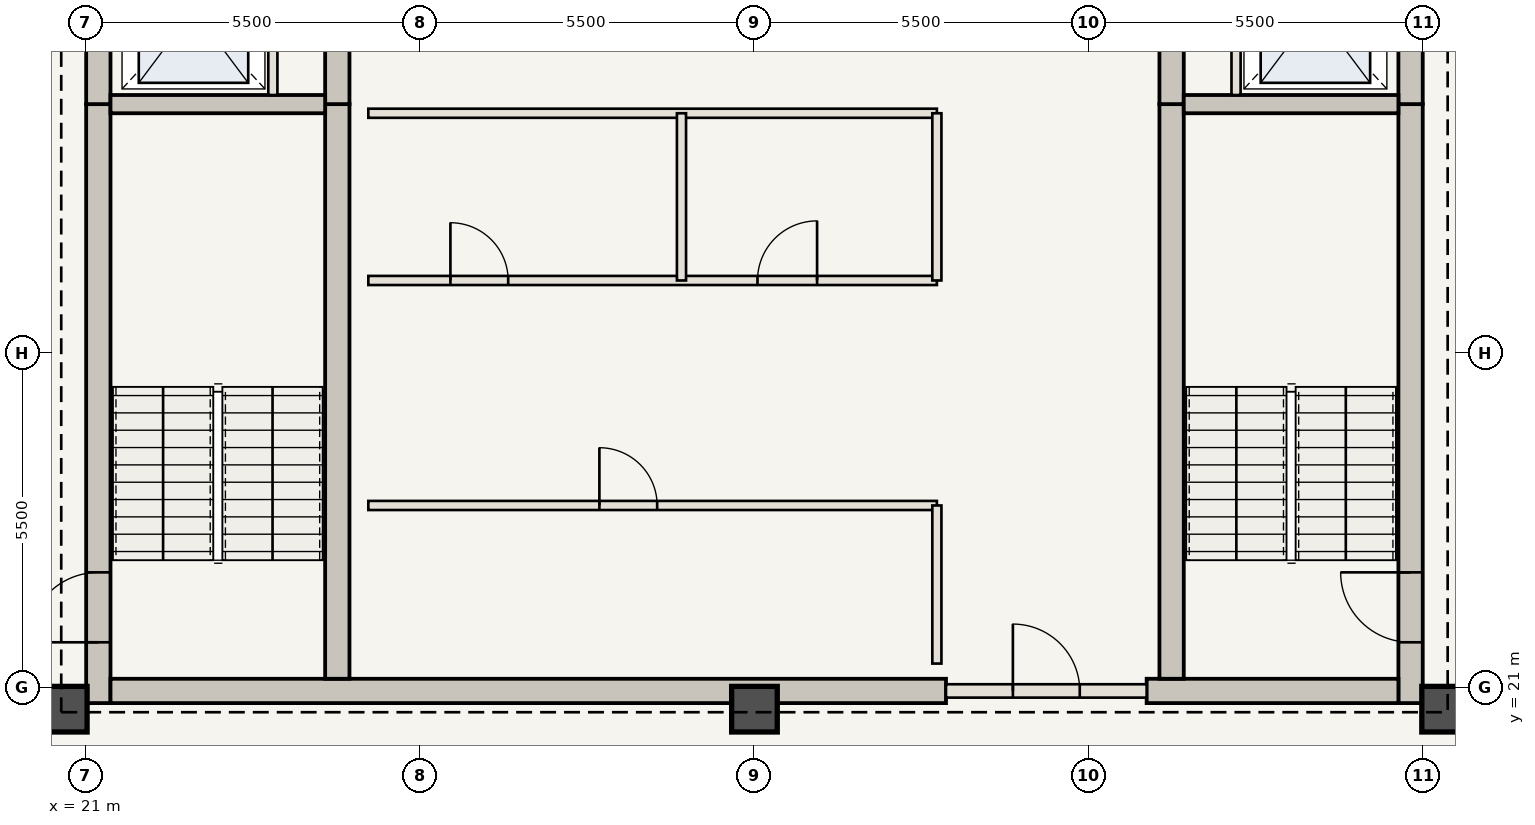
"""IFC4 building model, lengths in metres.
Left out: names, types, materials, properties, quantities, classifications, styles, units other than length and angle.
Written with IfcOpenShell. Run it as: python <this file> out.ifc"""

import sys

from ifc_helpers import new_model, si_unit, direction, frame, frame_2d, origin, origin_2d, place, context, subcontext, project, spatial, rectangle, extrude, element, fill, save


model = new_model("IFC4")
c1 = context("Model", 3, precision=1e-05, world=origin(), true_north=direction((0.0, 1.0)))
c2 = subcontext(c1, "Body", "Model", "MODEL_VIEW")
j1 = project(units=[si_unit("LENGTHUNIT", "METRE"), si_unit("PLANEANGLEUNIT", "RADIAN")], contexts=[c1])
p1 = place(None, origin())
s1 = spatial("IfcSite", under=j1, at=p1, CompositionType="ELEMENT")
p2 = place(p1, origin())
s2 = spatial("IfcBuilding", under=s1, at=p2, CompositionType="ELEMENT")
p3 = place(p2, frame((0.0, 0.0, 300.65)))
s3 = spatial("IfcBuildingStorey", under=s2, at=p3, CompositionType="ELEMENT", Elevation=300.65)
p4 = place(p3, frame((21.21, 20.75, 0.0), z_axis=(0.0, 0.0, 1.0), x_axis=(0.0, 1.0, 0.0)))
e1 = element("IfcWall", 1, at=p4, inside=s3, PredefinedType="SHEAR", context=c2, shape_type="SweptSolid", body=[
    extrude(rectangle(XDim=9.85, YDim=0.4, at=frame_2d((4.925, 0.0))), origin(), (0.0, 0.0, 1.0), 3.85),
])
p5 = place(p4, frame((1.0, 0.0, 0.0)))
e2 = element("IfcOpeningElement", 2, at=p5, cuts=e1, PredefinedType="OPENING", context=c2, shape_type="SweptSolid", body=[
    extrude(rectangle(XDim=1.15, YDim=2.15, at=frame_2d((0.575, 1.075))), frame((0.0, 0.21, 0.0), z_axis=(0.0, -1.0, 0.0), x_axis=(1.0, 0.0, 0.0)), (0.0, 0.0, 1.0), 0.42),
])
p6 = place(p3, frame((21.21, 30.6, 0.0), z_axis=(0.0, 0.0, 1.0), x_axis=(0.0, 1.0, 0.0)))
e3 = element("IfcWall", 3, at=p6, inside=s3, PredefinedType="SHEAR", context=c2, shape_type="SweptSolid", body=[
    extrude(rectangle(XDim=12.6, YDim=0.4, at=frame_2d((6.3, 0.0))), origin(), (0.0, 0.0, 1.0), 3.85),
])
p7 = place(p6, frame((4.2, 0.0, 0.0)))
e4 = element("IfcOpeningElement", 4, at=p7, cuts=e3, PredefinedType="OPENING", context=c2, shape_type="SweptSolid", body=[
    extrude(rectangle(XDim=1.1, YDim=2.15, at=frame_2d((0.55, 1.075))), frame((0.0, 0.21, 0.0), z_axis=(0.0, -1.0, 0.0), x_axis=(1.0, 0.0, 0.0)), (0.0, 0.0, 1.0), 0.42),
])
p8 = place(p6, frame((9.2, 0.0, 0.0)))
e5 = element("IfcOpeningElement", 5, at=p8, cuts=e3, PredefinedType="OPENING", context=c2, shape_type="SweptSolid", body=[
    extrude(rectangle(XDim=0.92, YDim=2.1, at=frame_2d((0.46, 1.05))), frame((0.0, 0.21, 0.0), z_axis=(0.0, -1.0, 0.0), x_axis=(1.0, 0.0, 0.0)), (0.0, 0.0, 1.0), 0.42),
])
p9 = place(p3, frame((42.79, 20.75, 0.0), z_axis=(0.0, 0.0, 1.0), x_axis=(0.0, 1.0, 0.0)))
e6 = element("IfcWall", 6, at=p9, inside=s3, PredefinedType="SHEAR", context=c2, shape_type="SweptSolid", body=[
    extrude(rectangle(XDim=9.85, YDim=0.4, at=frame_2d((4.925, 0.0))), origin(), (0.0, 0.0, 1.0), 3.85),
])
p10 = place(p9, frame((1.0, 0.0, 0.0)))
e7 = element("IfcOpeningElement", 7, at=p10, cuts=e6, PredefinedType="OPENING", context=c2, shape_type="SweptSolid", body=[
    extrude(rectangle(XDim=1.15, YDim=2.15, at=frame_2d((0.575, 1.075))), frame((0.0, 0.21, 0.0), z_axis=(0.0, -1.0, 0.0), x_axis=(1.0, 0.0, 0.0)), (0.0, 0.0, 1.0), 0.42),
])
p11 = place(p3, frame((42.79, 30.6, 0.0), z_axis=(0.0, 0.0, 1.0), x_axis=(0.0, 1.0, 0.0)))
e8 = element("IfcWall", 8, at=p11, inside=s3, PredefinedType="SHEAR", context=c2, shape_type="SweptSolid", body=[
    extrude(rectangle(XDim=12.6, YDim=0.4, at=frame_2d((6.3, 0.0))), origin(), (0.0, 0.0, 1.0), 3.85),
])
p12 = place(p11, frame((4.2, 0.0, 0.0)))
e9 = element("IfcOpeningElement", 9, at=p12, cuts=e8, PredefinedType="OPENING", context=c2, shape_type="SweptSolid", body=[
    extrude(rectangle(XDim=1.1, YDim=2.15, at=frame_2d((0.55, 1.075))), frame((0.0, 0.21, 0.0), z_axis=(0.0, -1.0, 0.0), x_axis=(1.0, 0.0, 0.0)), (0.0, 0.0, 1.0), 0.42),
])
p13 = place(p11, frame((8.05, 0.0, 0.0)))
e10 = element("IfcOpeningElement", 10, at=p13, cuts=e8, PredefinedType="OPENING", context=c2, shape_type="SweptSolid", body=[
    extrude(rectangle(XDim=0.88, YDim=2.1, at=frame_2d((0.44, 1.05))), frame((0.0, 0.21, 0.0), z_axis=(0.0, -1.0, 0.0), x_axis=(1.0, 0.0, 0.0)), (0.0, 0.0, 1.0), 0.42),
])
p14 = place(p11, frame((9.45, 0.0, 0.0)))
e11 = element("IfcOpeningElement", 11, at=p14, cuts=e8, PredefinedType="OPENING", context=c2, shape_type="SweptSolid", body=[
    extrude(rectangle(XDim=0.88, YDim=2.1, at=frame_2d((0.44, 1.05))), frame((0.0, 0.21, 0.0), z_axis=(0.0, -1.0, 0.0), x_axis=(1.0, 0.0, 0.0)), (0.0, 0.0, 1.0), 0.42),
])
p15 = place(p11, frame((10.85, 0.0, 0.0)))
e12 = element("IfcOpeningElement", 12, at=p15, cuts=e8, PredefinedType="OPENING", context=c2, shape_type="SweptSolid", body=[
    extrude(rectangle(XDim=0.88, YDim=2.1, at=frame_2d((0.44, 1.05))), frame((0.0, 0.21, 0.0), z_axis=(0.0, -1.0, 0.0), x_axis=(1.0, 0.0, 0.0)), (0.0, 0.0, 1.0), 0.42),
])
p16 = place(p3, frame((21.41, 20.95, 0.0), z_axis=(0.0, 0.0, 1.0), x_axis=(1.0, 0.0, 0.0)))
e13 = element("IfcWall", 13, at=p16, inside=s3, PredefinedType="SHEAR", context=c2, shape_type="SweptSolid", body=[
    extrude(rectangle(XDim=13.74, YDim=0.4, at=frame_2d((6.87, 0.0))), origin(), (0.0, 0.0, 1.0), 3.85),
])
p17 = place(p3, frame((38.45, 20.95, 0.0), z_axis=(0.0, 0.0, 1.0), x_axis=(1.0, 0.0, 0.0)))
e14 = element("IfcWall", 14, at=p17, inside=s3, PredefinedType="SHEAR", context=c2, shape_type="SweptSolid", body=[
    extrude(rectangle(XDim=4.14, YDim=0.4, at=frame_2d((2.07, 0.0))), origin(), (0.0, 0.0, 1.0), 3.85),
])
p18 = place(p3, frame((25.14, 21.15, 0.0), z_axis=(0.0, 0.0, 1.0), x_axis=(0.0, 1.0, 0.0)))
e15 = element("IfcWall", 15, at=p18, inside=s3, PredefinedType="SHEAR", context=c2, shape_type="SweptSolid", body=[
    extrude(rectangle(XDim=9.45, YDim=0.4, at=frame_2d((4.725, 0.0))), origin(), (0.0, 0.0, 1.0), 3.85),
])
p19 = place(p3, frame((25.14, 30.6, 0.0), z_axis=(0.0, 0.0, 1.0), x_axis=(0.0, 1.0, 0.0)))
e16 = element("IfcWall", 16, at=p19, inside=s3, PredefinedType="SHEAR", context=c2, shape_type="SweptSolid", body=[
    extrude(rectangle(XDim=12.2, YDim=0.4, at=frame_2d((6.1, 0.0))), origin(), (0.0, 0.0, 1.0), 3.85),
])
p20 = place(p19, frame((6.25, 0.0, 0.0)))
e17 = element("IfcOpeningElement", 17, at=p20, cuts=e16, PredefinedType="OPENING", context=c2, shape_type="SweptSolid", body=[
    extrude(rectangle(XDim=1.1, YDim=2.15, at=frame_2d((0.55, 1.075))), frame((0.0, 0.21, 0.0), z_axis=(0.0, -1.0, 0.0), x_axis=(1.0, 0.0, 0.0)), (0.0, 0.0, 1.0), 0.42),
])
p21 = place(p3, frame((38.86, 21.15, 0.0), z_axis=(0.0, 0.0, 1.0), x_axis=(0.0, 1.0, 0.0)))
e18 = element("IfcWall", 18, at=p21, inside=s3, PredefinedType="SHEAR", context=c2, shape_type="SweptSolid", body=[
    extrude(rectangle(XDim=9.45, YDim=0.4, at=frame_2d((4.725, 0.0))), origin(), (0.0, 0.0, 1.0), 3.85),
])
p22 = place(p3, frame((38.86, 30.6, 0.0), z_axis=(0.0, 0.0, 1.0), x_axis=(0.0, 1.0, 0.0)))
e19 = element("IfcWall", 19, at=p22, inside=s3, PredefinedType="SHEAR", context=c2, shape_type="SweptSolid", body=[
    extrude(rectangle(XDim=12.2, YDim=0.4, at=frame_2d((6.1, 0.0))), origin(), (0.0, 0.0, 1.0), 3.85),
])
for number, where, z_axis, x_axis in (
    (20, (20.65, 20.65, 0.0), (0.0, 0.0, 1.0), (1.0, 0.0, 0.0)),
    (21, (32.0, 20.65, 0.0), (0.0, 0.0, 1.0), (1.0, 0.0, 0.0)),
    (22, (43.35, 20.65, 0.0), (0.0, 0.0, 1.0), (1.0, 0.0, 0.0)),
):
    element("IfcColumn", number, at=place(p3, frame(where, z_axis=z_axis, x_axis=x_axis)), inside=s3, PredefinedType="COLUMN", context=c2, shape_type="SweptSolid", body=[
        extrude(rectangle(XDim=0.75, YDim=0.75, at=origin_2d()), origin(), (0.0, 0.0, 1.0), 3.85),
    ])
for number, where, z_axis, x_axis in (
    (23, (21.41, 30.6, 0.0), (0.0, 0.0, 1.0), (1.0, 0.0, 0.0)),
    (24, (39.06, 30.6, 0.0), (0.0, 0.0, 1.0), (1.0, 0.0, 0.0)),
):
    element("IfcWall", number, at=place(p3, frame(where, z_axis=z_axis, x_axis=x_axis)), inside=s3, PredefinedType="SHEAR", context=c2, shape_type="SweptSolid", body=[
        extrude(rectangle(XDim=3.53, YDim=0.3, at=frame_2d((1.765, 0.0))), origin(), (0.0, 0.0, 1.0), 3.685),
    ])
for number, where, z_axis, x_axis in (
    (25, (24.08, 30.75, 0.0), (0.0, 0.0, 1.0), (0.0, 1.0, 0.0)),
    (26, (39.92, 30.75, 0.0), (0.0, 0.0, 1.0), (0.0, 1.0, 0.0)),
):
    element("IfcWall", number, at=place(p3, frame(where, z_axis=z_axis, x_axis=x_axis)), inside=s3, PredefinedType="STANDARD", context=c2, shape_type="SweptSolid", body=[
        extrude(rectangle(XDim=2.65, YDim=0.15, at=frame_2d((1.325, 0.0))), origin(), (0.0, 0.0, 1.0), 3.685),
    ])
p23 = place(p3, frame((35.15, 20.95, 0.0), z_axis=(0.0, 0.0, 1.0), x_axis=(1.0, 0.0, 0.0)))
e27 = element("IfcWall", 27, at=p23, inside=s3, PredefinedType="STANDARD", context=c2, shape_type="SweptSolid", body=[
    extrude(rectangle(XDim=3.3, YDim=0.22, at=frame_2d((1.65, 0.0))), origin(), (0.0, 0.0, 1.0), 3.685),
])
p24 = place(p23, frame((1.1, 0.0, 0.0)))
e28 = element("IfcOpeningElement", 28, at=p24, cuts=e27, PredefinedType="OPENING", context=c2, shape_type="SweptSolid", body=[
    extrude(rectangle(XDim=1.1, YDim=2.15, at=frame_2d((0.55, 1.075))), frame((0.0, 0.12, 0.0), z_axis=(0.0, -1.0, 0.0), x_axis=(1.0, 0.0, 0.0)), (0.0, 0.0, 1.0), 0.24),
])
p25 = place(p3, frame((25.65, 24.0, 0.0), z_axis=(0.0, 0.0, 1.0), x_axis=(1.0, 0.0, 0.0)))
e29 = element("IfcWall", 29, at=p25, inside=s3, PredefinedType="STANDARD", context=c2, shape_type="SweptSolid", body=[
    extrude(rectangle(XDim=9.35, YDim=0.15, at=frame_2d((4.675, 0.0))), origin(), (0.0, 0.0, 1.0), 3.685),
])
p26 = place(p25, frame((3.8, 0.0, 0.0)))
e30 = element("IfcOpeningElement", 30, at=p26, cuts=e29, PredefinedType="OPENING", context=c2, shape_type="SweptSolid", body=[
    extrude(rectangle(XDim=0.95, YDim=2.15, at=frame_2d((0.475, 1.075))), frame((0.0, 0.085, 0.0), z_axis=(0.0, -1.0, 0.0), x_axis=(1.0, 0.0, 0.0)), (0.0, 0.0, 1.0), 0.17),
])
p27 = place(p3, frame((35.0, 21.4, 0.0), z_axis=(0.0, 0.0, 1.0), x_axis=(0.0, 1.0, 0.0)))
e31 = element("IfcWall", 31, at=p27, inside=s3, PredefinedType="STANDARD", context=c2, shape_type="SweptSolid", body=[
    extrude(rectangle(XDim=2.6, YDim=0.15, at=frame_2d((1.3, 0.0))), origin(), (0.0, 0.0, 1.0), 3.685),
])
p28 = place(p3, frame((25.65, 27.7, 0.0), z_axis=(0.0, 0.0, 1.0), x_axis=(1.0, 0.0, 0.0)))
e32 = element("IfcWall", 32, at=p28, inside=s3, PredefinedType="STANDARD", context=c2, shape_type="SweptSolid", body=[
    extrude(rectangle(XDim=9.35, YDim=0.15, at=frame_2d((4.675, 0.0))), origin(), (0.0, 0.0, 1.0), 3.685),
])
p29 = place(p28, frame((1.35, 0.0, 0.0)))
e33 = element("IfcOpeningElement", 33, at=p29, cuts=e32, PredefinedType="OPENING", context=c2, shape_type="SweptSolid", body=[
    extrude(rectangle(XDim=0.95, YDim=2.15, at=frame_2d((0.475, 1.075))), frame((0.0, 0.085, 0.0), z_axis=(0.0, -1.0, 0.0), x_axis=(1.0, 0.0, 0.0)), (0.0, 0.0, 1.0), 0.17),
])
p30 = place(p28, frame((6.4, 0.0, 0.0)))
e34 = element("IfcOpeningElement", 34, at=p30, cuts=e32, PredefinedType="OPENING", context=c2, shape_type="SweptSolid", body=[
    extrude(rectangle(XDim=0.98, YDim=2.2, at=frame_2d((0.49, 1.1))), frame((0.0, 0.085, 0.0), z_axis=(0.0, -1.0, 0.0), x_axis=(1.0, 0.0, 0.0)), (0.0, 0.0, 1.0), 0.17),
])
p31 = place(p3, frame((25.65, 30.45, 0.0), z_axis=(0.0, 0.0, 1.0), x_axis=(1.0, 0.0, 0.0)))
e35 = element("IfcWall", 35, at=p31, inside=s3, PredefinedType="STANDARD", context=c2, shape_type="SweptSolid", body=[
    extrude(rectangle(XDim=9.35, YDim=0.15, at=frame_2d((4.675, 0.0))), origin(), (0.0, 0.0, 1.0), 3.685),
])
for number, where, z_axis, x_axis in (
    (36, (30.8, 27.7, 0.0), (0.0, 0.0, 1.0), (0.0, 1.0, 0.0)),
    (37, (35.0, 27.7, 0.0), (0.0, 0.0, 1.0), (0.0, 1.0, 0.0)),
):
    element("IfcWall", number, at=place(p3, frame(where, z_axis=z_axis, x_axis=x_axis)), inside=s3, PredefinedType="STANDARD", context=c2, shape_type="SweptSolid", body=[
        extrude(rectangle(XDim=2.75, YDim=0.15, at=frame_2d((1.375, 0.0))), origin(), (0.0, 0.0, 1.0), 3.685),
    ])
p32 = place(p5, origin())
e38 = element("IfcDoor", 38, at=p32, inside=s3, OperationType="SINGLE_SWING_LEFT", PredefinedType="DOOR", context=c2, shape_type="SweptSolid", body=[
    extrude(rectangle(XDim=1.15, YDim=2.15, at=frame_2d((0.575, 1.075))), frame((0.0, 0.025, 0.0), z_axis=(0.0, -1.0, 0.0), x_axis=(1.0, 0.0, 0.0)), (0.0, 0.0, 1.0), 0.05),
])
fill(e2, e38)
p33 = place(p10, origin())
e39 = element("IfcDoor", 39, at=p33, inside=s3, OperationType="SINGLE_SWING_RIGHT", PredefinedType="DOOR", context=c2, shape_type="SweptSolid", body=[
    extrude(rectangle(XDim=1.15, YDim=2.15, at=frame_2d((0.575, 1.075))), frame((0.0, 0.025, 0.0), z_axis=(0.0, -1.0, 0.0), x_axis=(1.0, 0.0, 0.0)), (0.0, 0.0, 1.0), 0.05),
])
fill(e7, e39)
p34 = place(p24, origin())
e40 = element("IfcDoor", 40, at=p34, inside=s3, OperationType="SINGLE_SWING_LEFT", PredefinedType="DOOR", context=c2, shape_type="SweptSolid", body=[
    extrude(rectangle(XDim=1.1, YDim=2.15, at=frame_2d((0.55, 1.075))), frame((0.0, 0.025, 0.0), z_axis=(0.0, -1.0, 0.0), x_axis=(1.0, 0.0, 0.0)), (0.0, 0.0, 1.0), 0.05),
])
fill(e28, e40)
p35 = place(p26, origin())
e41 = element("IfcDoor", 41, at=p35, inside=s3, OperationType="SINGLE_SWING_LEFT", PredefinedType="DOOR", context=c2, shape_type="SweptSolid", body=[
    extrude(rectangle(XDim=0.95, YDim=2.15, at=frame_2d((0.475, 1.075))), frame((0.0, 0.025, 0.0), z_axis=(0.0, -1.0, 0.0), x_axis=(1.0, 0.0, 0.0)), (0.0, 0.0, 1.0), 0.05),
])
fill(e30, e41)
p36 = place(p29, origin())
e42 = element("IfcDoor", 42, at=p36, inside=s3, OperationType="SINGLE_SWING_LEFT", PredefinedType="DOOR", context=c2, shape_type="SweptSolid", body=[
    extrude(rectangle(XDim=0.95, YDim=2.15, at=frame_2d((0.475, 1.075))), frame((0.0, 0.025, 0.0), z_axis=(0.0, -1.0, 0.0), x_axis=(1.0, 0.0, 0.0)), (0.0, 0.0, 1.0), 0.05),
])
fill(e33, e42)
p37 = place(p30, origin())
e43 = element("IfcDoor", 43, at=p37, inside=s3, OperationType="SINGLE_SWING_RIGHT", PredefinedType="DOOR", context=c2, shape_type="SweptSolid", body=[
    extrude(rectangle(XDim=0.98, YDim=2.2, at=frame_2d((0.49, 1.1))), frame((0.0, 0.025, 0.0), z_axis=(0.0, -1.0, 0.0), x_axis=(1.0, 0.0, 0.0)), (0.0, 0.0, 1.0), 0.05),
])
fill(e34, e43)
save(model, sys.argv[1])
